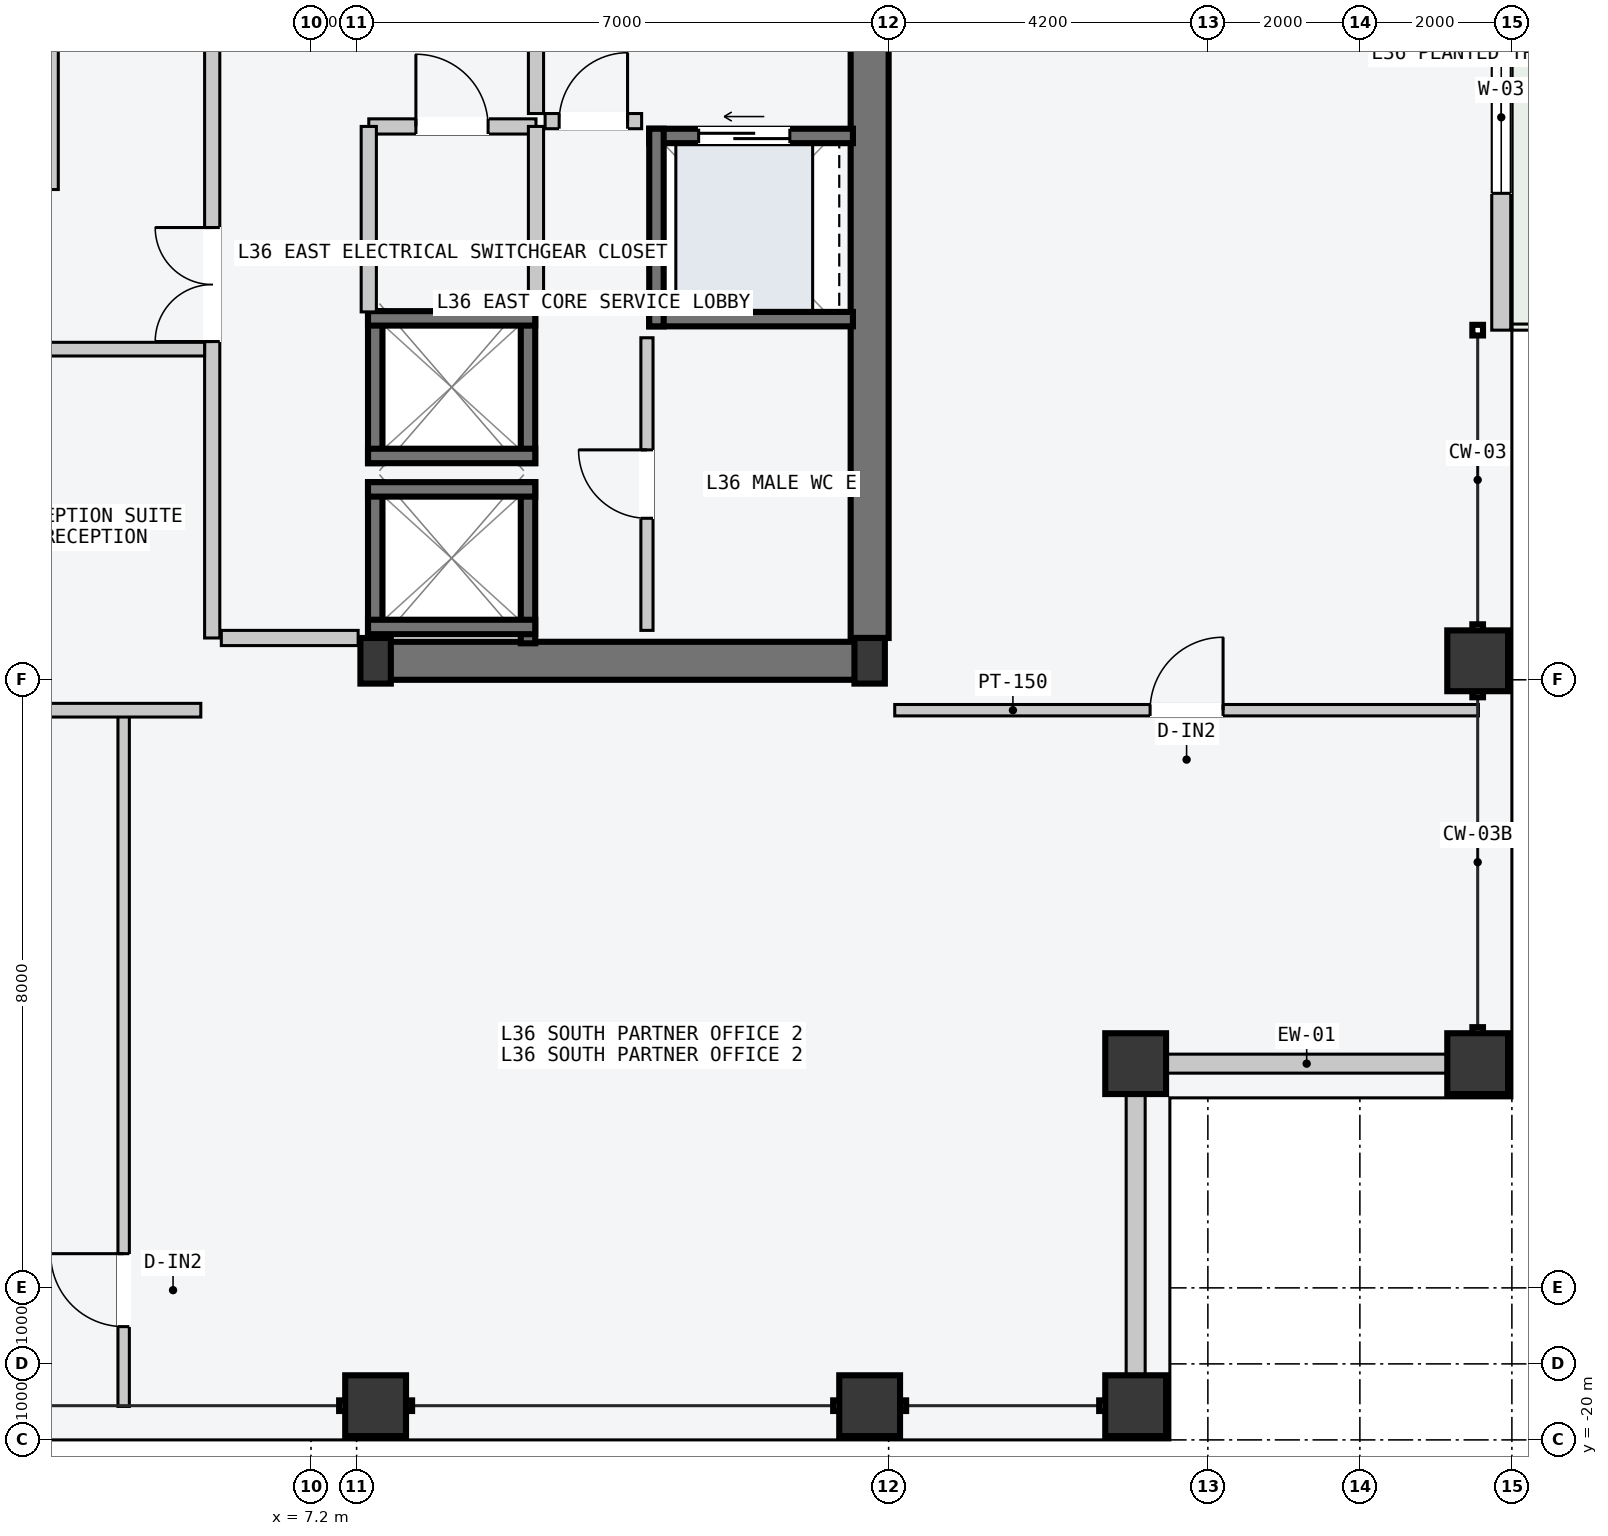
"""IFC4 building model, lengths in metres.
Left out: names, types, materials, properties, quantities, classifications, styles, units other than length and angle.
Written with IfcOpenShell. Run it as: python <this file> out.ifc"""

import sys

from ifc_helpers import new_model, si_unit, direction, frame, frame_2d, origin, origin_2d, place, context, subcontext, project, spatial, rectangle, hollow_rectangle, i_section, extrude, element, fill, save


model = new_model("IFC4")
c1 = context("Model", 3, precision=1e-05, world=origin(), true_north=direction((0.0, 1.0)))
c2 = subcontext(c1, "Body", "Model", "MODEL_VIEW")
j1 = project(units=[si_unit("LENGTHUNIT", "METRE"), si_unit("PLANEANGLEUNIT", "RADIAN")], contexts=[c1])
p1 = place(None, origin())
s1 = spatial("IfcSite", under=j1, at=p1, CompositionType="ELEMENT")
p2 = place(p1, origin())
s2 = spatial("IfcBuilding", under=s1, at=p2, CompositionType="ELEMENT")
p3 = place(p2, frame((0.0, 0.0, 138.6)))
s3 = spatial("IfcBuildingStorey", under=s2, at=p3, CompositionType="ELEMENT", Elevation=138.6)
p4 = place(p3, frame((8.07, -9.75, -0.2), z_axis=(0.0, 0.0, 1.0), x_axis=(1.0, 0.0, 0.0)))
e1 = element("IfcWall", 1, at=p4, inside=s3, PredefinedType="SHEAR", context=c2, shape_type="SweptSolid", body=[
    extrude(rectangle(XDim=6.46, YDim=0.5, at=frame_2d((3.23, 0.0))), origin(), (0.0, 0.0, 1.0), 3.6),
])
p5 = place(p3, frame((14.55, -9.45, -0.2), z_axis=(0.0, 0.0, 1.0), x_axis=(0.0, 1.0, 0.0)))
e2 = element("IfcWall", 2, at=p5, inside=s3, PredefinedType="SHEAR", context=c2, shape_type="SweptSolid", body=[
    extrude(rectangle(XDim=9.15, YDim=0.5, at=frame_2d((4.575, 0.0))), origin(), (0.0, 0.0, 1.0), 3.6),
])
for number, where, z_axis, x_axis in (
    (3, (8.05, -9.75, 0.0), (0.0, 0.0, 1.0), (1.0, 0.0, 0.0)),
    (4, (14.55, -9.75, 0.0), (0.0, 0.0, 1.0), (1.0, 0.0, 0.0)),
):
    element("IfcColumn", number, at=place(p3, frame(where, z_axis=z_axis, x_axis=x_axis)), inside=s3, PredefinedType="COLUMN", context=c2, shape_type="SweptSolid", body=[
        extrude(i_section(OverallWidth=0.4, OverallDepth=0.6, WebThickness=0.022, FlangeThickness=0.036, at=origin_2d()), origin(), (0.0, 0.0, 1.0), 3.6),
    ])
for number, where, z_axis, x_axis in (
    (5, (8.05, -19.55, 0.0), (0.0, 0.0, 1.0), (1.0, 0.0, 0.0)),
    (6, (14.55, -19.55, 0.0), (0.0, 0.0, 1.0), (1.0, 0.0, 0.0)),
    (7, (18.05, -19.55, 0.0), (0.0, 0.0, 1.0), (1.0, 0.0, 0.0)),
    (8, (22.55, -15.05, 0.0), (0.0, 0.0, 1.0), (0.0, 1.0, 0.0)),
    (9, (22.55, -9.75, 0.0), (0.0, 0.0, 1.0), (0.0, 1.0, 0.0)),
    (10, (18.05, -15.05, 0.0), (0.0, 0.0, 1.0), (1.0, 0.0, 0.0)),
):
    element("IfcColumn", number, at=place(p3, frame(where, z_axis=z_axis, x_axis=x_axis)), inside=s3, PredefinedType="COLUMN", context=c2, shape_type="SweptSolid", body=[
        extrude(hollow_rectangle(XDim=0.8, YDim=0.8, WallThickness=0.036, at=origin_2d()), origin(), (0.0, 0.0, 1.0), 3.6),
    ])
p6 = place(p3, frame((22.86, -5.4, 0.0), z_axis=(0.0, 0.0, 1.0), x_axis=(0.0, 1.0, 0.0)))
e11 = element("IfcWall", 11, at=p6, inside=s3, PredefinedType="STANDARD", context=c2, shape_type="SweptSolid", body=[
    extrude(rectangle(XDim=10.8, YDim=0.25, at=frame_2d((5.4, 0.0))), origin(), (0.0, 0.0, 1.0), 3.4),
])
p7 = place(p6, frame((7.2, 0.0, 0.0)))
e12 = element("IfcOpeningElement", 12, at=p7, cuts=e11, PredefinedType="OPENING", context=c2, shape_type="SweptSolid", body=[
    extrude(rectangle(XDim=1.6, YDim=2.2, at=frame_2d((0.8, 1.1))), frame((0.0, 0.135, 0.0), z_axis=(0.0, -1.0, 0.0), x_axis=(1.0, 0.0, 0.0)), (0.0, 0.0, 1.0), 0.27),
])
p8 = place(p6, frame((1.8, 0.0, 0.85)))
e13 = element("IfcOpeningElement", 13, at=p8, cuts=e11, PredefinedType="OPENING", context=c2, shape_type="SweptSolid", body=[
    extrude(rectangle(XDim=2.0, YDim=2.1, at=frame_2d((1.0, 1.05))), frame((0.0, 0.135, 0.0), z_axis=(0.0, -1.0, 0.0), x_axis=(1.0, 0.0, 0.0)), (0.0, 0.0, 1.0), 0.27),
])
for number, where, z_axis, x_axis in (
    (14, (18.46, -15.05, 0.0), (0.0, 0.0, 1.0), (1.0, 0.0, 0.0)),
    (15, (18.05, -19.14, 0.0), (0.0, 0.0, 1.0), (0.0, 1.0, 0.0)),
):
    element("IfcWall", number, at=place(p3, frame(where, z_axis=z_axis, x_axis=x_axis)), inside=s3, PredefinedType="STANDARD", context=c2, shape_type="SweptSolid", body=[
        extrude(rectangle(XDim=3.68, YDim=0.25, at=frame_2d((1.84, 0.0))), origin(), (0.0, 0.0, 1.0), 2.75),
    ])
for number, where, z_axis, x_axis in (
    (16, (8.045, -9.52, -0.2), (0.0, 0.0, 1.0), (0.0, 1.0, 0.0)),
    (17, (10.055, -9.52, -0.2), (0.0, 0.0, 1.0), (0.0, 1.0, 0.0)),
):
    element("IfcWall", number, at=place(p3, frame(where, z_axis=z_axis, x_axis=x_axis)), inside=s3, PredefinedType="SOLIDWALL", context=c2, shape_type="SweptSolid", body=[
        extrude(rectangle(XDim=2.12, YDim=0.19, at=frame_2d((1.06, 0.0))), origin(), (0.0, 0.0, 1.0), 3.6),
    ])
for number, where, z_axis, x_axis in (
    (18, (7.95, -7.495, -0.2), (0.0, 0.0, 1.0), (1.0, 0.0, 0.0)),
    (19, (7.95, -9.305, -0.2), (0.0, 0.0, 1.0), (1.0, 0.0, 0.0)),
):
    element("IfcWall", number, at=place(p3, frame(where, z_axis=z_axis, x_axis=x_axis)), inside=s3, PredefinedType="SOLIDWALL", context=c2, shape_type="SweptSolid", body=[
        extrude(rectangle(XDim=2.2, YDim=0.19, at=frame_2d((1.1, 0.0))), origin(), (0.0, 0.0, 1.0), 3.6),
    ])
for number, where, z_axis, x_axis in (
    (20, (8.045, -7.15, -0.2), (0.0, 0.0, 1.0), (0.0, 1.0, 0.0)),
    (21, (10.055, -7.15, -0.2), (0.0, 0.0, 1.0), (0.0, 1.0, 0.0)),
):
    element("IfcWall", number, at=place(p3, frame(where, z_axis=z_axis, x_axis=x_axis)), inside=s3, PredefinedType="SOLIDWALL", context=c2, shape_type="SweptSolid", body=[
        extrude(rectangle(XDim=2.0, YDim=0.19, at=frame_2d((1.0, 0.0))), origin(), (0.0, 0.0, 1.0), 3.6),
    ])
for number, where, z_axis, x_axis in (
    (22, (7.95, -5.245, -0.2), (0.0, 0.0, 1.0), (1.0, 0.0, 0.0)),
    (23, (7.95, -7.055, -0.2), (0.0, 0.0, 1.0), (1.0, 0.0, 0.0)),
):
    element("IfcWall", number, at=place(p3, frame(where, z_axis=z_axis, x_axis=x_axis)), inside=s3, PredefinedType="SOLIDWALL", context=c2, shape_type="SweptSolid", body=[
        extrude(rectangle(XDim=2.2, YDim=0.19, at=frame_2d((1.1, 0.0))), origin(), (0.0, 0.0, 1.0), 3.6),
    ])
p9 = place(p3, frame((11.65, -2.845, -0.2), z_axis=(0.0, 0.0, 1.0), x_axis=(1.0, 0.0, 0.0)))
e24 = element("IfcWall", 24, at=p9, inside=s3, PredefinedType="SOLIDWALL", context=c2, shape_type="SweptSolid", body=[
    extrude(rectangle(XDim=2.68, YDim=0.19, at=frame_2d((1.34, 0.0))), origin(), (0.0, 0.0, 1.0), 3.6),
])
p10 = place(p9, frame((0.65, 0.0, 0.2)))
e25 = element("IfcOpeningElement", 25, at=p10, cuts=e24, PredefinedType="OPENING", context=c2, shape_type="SweptSolid", body=[
    extrude(rectangle(XDim=1.2, YDim=2.2, at=frame_2d((0.6, 1.1))), frame((0.0, 0.105, 0.0), z_axis=(0.0, -1.0, 0.0), x_axis=(1.0, 0.0, 0.0)), (0.0, 0.0, 1.0), 0.21),
])
p11 = place(p3, frame((11.65, -5.255, -0.2), z_axis=(0.0, 0.0, 1.0), x_axis=(1.0, 0.0, 0.0)))
e26 = element("IfcWall", 26, at=p11, inside=s3, PredefinedType="SOLIDWALL", context=c2, shape_type="SweptSolid", body=[
    extrude(rectangle(XDim=2.68, YDim=0.19, at=frame_2d((1.34, 0.0))), origin(), (0.0, 0.0, 1.0), 3.6),
])
p12 = place(p3, frame((11.745, -5.35, -0.2), z_axis=(0.0, 0.0, 1.0), x_axis=(0.0, 1.0, 0.0)))
e27 = element("IfcWall", 27, at=p12, inside=s3, PredefinedType="SOLIDWALL", context=c2, shape_type="SweptSolid", body=[
    extrude(rectangle(XDim=2.6, YDim=0.19, at=frame_2d((1.3, 0.0))), origin(), (0.0, 0.0, 1.0), 3.6),
])
p13 = place(p3, frame((5.9, -9.45, 0.0), z_axis=(0.0, 0.0, 1.0), x_axis=(0.0, 1.0, 0.0)))
e28 = element("IfcWall", 28, at=p13, inside=s3, PredefinedType="PARTITIONING", context=c2, shape_type="SweptSolid", body=[
    extrude(rectangle(XDim=18.9, YDim=0.2, at=frame_2d((9.45, 0.0))), origin(), (0.0, 0.0, 1.0), 3.4),
])
p14 = place(p13, frame((3.9, 0.0, 0.0)))
e29 = element("IfcOpeningElement", 29, at=p14, cuts=e28, PredefinedType="OPENING", context=c2, shape_type="SweptSolid", body=[
    extrude(rectangle(XDim=1.5, YDim=2.2, at=frame_2d((0.75, 1.1))), frame((0.0, 0.11, 0.0), z_axis=(0.0, -1.0, 0.0), x_axis=(1.0, 0.0, 0.0)), (0.0, 0.0, 1.0), 0.22),
])
p15 = place(p3, frame((6.02, -9.45, 0.0), z_axis=(0.0, 0.0, 1.0), x_axis=(1.0, 0.0, 0.0)))
e30 = element("IfcWall", 30, at=p15, inside=s3, PredefinedType="PARTITIONING", context=c2, shape_type="SweptSolid", body=[
    extrude(rectangle(XDim=1.8, YDim=0.2, at=frame_2d((0.9, 0.0))), origin(), (0.0, 0.0, 1.0), 3.4),
])
p16 = place(p3, frame((10.16, -2.55, 0.0), z_axis=(0.0, 0.0, 1.0), x_axis=(0.0, 1.0, 0.0)))
e31 = element("IfcWall", 31, at=p16, inside=s3, PredefinedType="PARTITIONING", context=c2, shape_type="SweptSolid", body=[
    extrude(rectangle(XDim=3.4, YDim=0.2, at=frame_2d((1.7, 0.0))), origin(), (0.0, 0.0, 1.0), 3.4),
])
p17 = place(p16, frame((1.3, 0.0, 0.0)))
e32 = element("IfcOpeningElement", 32, at=p17, cuts=e31, PredefinedType="OPENING", context=c2, shape_type="SweptSolid", body=[
    extrude(rectangle(XDim=1.1, YDim=2.15, at=frame_2d((0.55, 1.075))), frame((0.0, 0.11, 0.0), z_axis=(0.0, -1.0, 0.0), x_axis=(1.0, 0.0, 0.0)), (0.0, 0.0, 1.0), 0.22),
])
p18 = place(p3, frame((10.28, -2.65, 0.0), z_axis=(0.0, 0.0, 1.0), x_axis=(1.0, 0.0, 0.0)))
e33 = element("IfcWall", 33, at=p18, inside=s3, PredefinedType="PARTITIONING", context=c2, shape_type="SweptSolid", body=[
    extrude(rectangle(XDim=1.27, YDim=0.2, at=frame_2d((0.635, 0.0))), origin(), (0.0, 0.0, 1.0), 3.4),
])
p19 = place(p18, frame((0.185, 0.0, 0.0)))
e34 = element("IfcOpeningElement", 34, at=p19, cuts=e33, PredefinedType="OPENING", context=c2, shape_type="SweptSolid", body=[
    extrude(rectangle(XDim=0.9, YDim=2.15, at=frame_2d((0.45, 1.075))), frame((0.0, 0.11, 0.0), z_axis=(0.0, -1.0, 0.0), x_axis=(1.0, 0.0, 0.0)), (0.0, 0.0, 1.0), 0.22),
])
p20 = place(p3, frame((7.96, -2.72, 0.0), z_axis=(0.0, 0.0, 1.0), x_axis=(1.0, 0.0, 0.0)))
e35 = element("IfcWall", 35, at=p20, inside=s3, PredefinedType="PARTITIONING", context=c2, shape_type="SweptSolid", body=[
    extrude(rectangle(XDim=2.2, YDim=0.2, at=frame_2d((1.1, 0.0))), origin(), (0.0, 0.0, 1.0), 3.4),
])
p21 = place(p20, frame((0.62, 0.0, 0.0)))
e36 = element("IfcOpeningElement", 36, at=p21, cuts=e35, PredefinedType="OPENING", context=c2, shape_type="SweptSolid", body=[
    extrude(rectangle(XDim=0.95, YDim=2.1, at=frame_2d((0.475, 1.05))), frame((0.0, 0.11, 0.0), z_axis=(0.0, -1.0, 0.0), x_axis=(1.0, 0.0, 0.0)), (0.0, 0.0, 1.0), 0.22),
])
for number, where, z_axis, x_axis in (
    (37, (7.96, -5.16, 0.0), (0.0, 0.0, 1.0), (0.0, 1.0, 0.0)),
    (38, (10.16, -5.16, 0.0), (0.0, 0.0, 1.0), (0.0, 1.0, 0.0)),
):
    element("IfcWall", number, at=place(p3, frame(where, z_axis=z_axis, x_axis=x_axis)), inside=s3, PredefinedType="PARTITIONING", context=c2, shape_type="SweptSolid", body=[
        extrude(rectangle(XDim=2.44, YDim=0.2, at=frame_2d((1.22, 0.0))), origin(), (0.0, 0.0, 1.0), 3.4),
    ])
p22 = place(p3, frame((11.62, -9.35, 0.0), z_axis=(0.0, 0.0, 1.0), x_axis=(0.0, 1.0, 0.0)))
e39 = element("IfcWall", 39, at=p22, inside=s3, PredefinedType="PARTITIONING", context=c2, shape_type="SweptSolid", body=[
    extrude(rectangle(XDim=3.85, YDim=0.16, at=frame_2d((1.925, 0.0))), origin(), (0.0, 0.0, 1.0), 3.4),
])
p23 = place(p22, frame((1.475, 0.0, 0.0)))
e40 = element("IfcOpeningElement", 40, at=p23, cuts=e39, PredefinedType="OPENING", context=c2, shape_type="SweptSolid", body=[
    extrude(rectangle(XDim=0.9, YDim=2.15, at=frame_2d((0.45, 1.075))), frame((0.0, 0.09, 0.0), z_axis=(0.0, -1.0, 0.0), x_axis=(1.0, 0.0, 0.0)), (0.0, 0.0, 1.0), 0.18),
])
p24 = place(p3, frame((3.8, -3.55, 0.0), z_axis=(0.0, 0.0, 1.0), x_axis=(0.0, 1.0, 0.0)))
e41 = element("IfcWall", 41, at=p24, inside=s3, PredefinedType="PARTITIONING", context=c2, shape_type="SweptSolid", body=[
    extrude(rectangle(XDim=14.77, YDim=0.15, at=frame_2d((7.385, 0.0))), origin(), (0.0, 0.0, 1.0), 3.4),
])
p25 = place(p3, frame((-5.8, -5.65, 0.0), z_axis=(0.0, 0.0, 1.0), x_axis=(1.0, 0.0, 0.0)))
e42 = element("IfcWall", 42, at=p25, inside=s3, PredefinedType="PARTITIONING", context=c2, shape_type="SweptSolid", body=[
    extrude(rectangle(XDim=11.6, YDim=0.18, at=frame_2d((5.8, 0.0))), origin(), (0.0, 0.0, 1.0), 3.4),
])
p26 = place(p25, frame((5.1, 0.0, 0.0)))
e43 = element("IfcOpeningElement", 43, at=p26, cuts=e42, PredefinedType="OPENING", context=c2, shape_type="SweptSolid", body=[
    extrude(rectangle(XDim=1.4, YDim=2.2, at=frame_2d((0.7, 1.1))), frame((0.0, 0.1, 0.0), z_axis=(0.0, -1.0, 0.0), x_axis=(1.0, 0.0, 0.0)), (0.0, 0.0, 1.0), 0.2),
])
p27 = place(p3, frame((4.735, -19.56, 0.0), z_axis=(0.0, 0.0, 1.0), x_axis=(0.0, 1.0, 0.0)))
e44 = element("IfcWall", 44, at=p27, inside=s3, PredefinedType="PARTITIONING", context=c2, shape_type="SweptSolid", body=[
    extrude(rectangle(XDim=9.1, YDim=0.15, at=frame_2d((4.55, 0.0))), origin(), (0.0, 0.0, 1.0), 3.4),
])
p28 = place(p27, frame((1.05, 0.0, 0.0)))
e45 = element("IfcOpeningElement", 45, at=p28, cuts=e44, PredefinedType="OPENING", context=c2, shape_type="SweptSolid", body=[
    extrude(rectangle(XDim=0.96, YDim=2.18, at=frame_2d((0.48, 1.09))), frame((0.0, 0.085, 0.0), z_axis=(0.0, -1.0, 0.0), x_axis=(1.0, 0.0, 0.0)), (0.0, 0.0, 1.0), 0.17),
])
p29 = place(p3, frame((-5.75, -10.4, 0.0), z_axis=(0.0, 0.0, 1.0), x_axis=(1.0, 0.0, 0.0)))
e46 = element("IfcWall", 46, at=p29, inside=s3, PredefinedType="PARTITIONING", context=c2, shape_type="SweptSolid", body=[
    extrude(rectangle(XDim=11.5, YDim=0.18, at=frame_2d((5.75, 0.0))), origin(), (0.0, 0.0, 1.0), 3.4),
])
p30 = place(p29, frame((4.542, 0.0, 0.0)))
e47 = element("IfcOpeningElement", 47, at=p30, cuts=e46, PredefinedType="OPENING", context=c2, shape_type="SweptSolid", body=[
    extrude(rectangle(XDim=1.4, YDim=2.2, at=frame_2d((0.7, 1.1))), frame((0.0, 0.1, 0.0), z_axis=(0.0, -1.0, 0.0), x_axis=(1.0, 0.0, 0.0)), (0.0, 0.0, 1.0), 0.2),
])
p31 = place(p3, frame((14.88, -10.4, 0.0), z_axis=(0.0, 0.0, 1.0), x_axis=(1.0, 0.0, 0.0)))
e48 = element("IfcWall", 48, at=p31, inside=s3, PredefinedType="PARTITIONING", context=c2, shape_type="SweptSolid", body=[
    extrude(rectangle(XDim=7.68, YDim=0.15, at=frame_2d((3.84, 0.0))), origin(), (0.0, 0.0, 1.0), 3.4),
])
p32 = place(p31, frame((3.36, 0.0, 0.0)))
e49 = element("IfcOpeningElement", 49, at=p32, cuts=e48, PredefinedType="OPENING", context=c2, shape_type="SweptSolid", body=[
    extrude(rectangle(XDim=0.96, YDim=2.18, at=frame_2d((0.48, 1.09))), frame((0.0, 0.085, 0.0), z_axis=(0.0, -1.0, 0.0), x_axis=(1.0, 0.0, 0.0)), (0.0, 0.0, 1.0), 0.17),
])
p33 = place(p8, origin())
e50 = element("IfcWindow", 50, at=p33, inside=s3, PartitioningType="SINGLE_PANEL", PredefinedType="WINDOW", context=c2, shape_type="SweptSolid", body=[
    extrude(rectangle(XDim=2.0, YDim=2.1, at=frame_2d((1.0, 1.05))), frame((0.0, 0.03, 0.0), z_axis=(0.0, -1.0, 0.0), x_axis=(1.0, 0.0, 0.0)), (0.0, 0.0, 1.0), 0.06),
])
fill(e13, e50)
p34 = place(p10, origin())
e51 = element("IfcDoor", 51, at=p34, inside=s3, OperationType="SLIDING_TO_LEFT", PredefinedType="DOOR", context=c2, shape_type="SweptSolid", body=[
    extrude(rectangle(XDim=1.2, YDim=2.2, at=frame_2d((0.6, 1.1))), frame((0.0, 0.025, 0.0), z_axis=(0.0, -1.0, 0.0), x_axis=(1.0, 0.0, 0.0)), (0.0, 0.0, 1.0), 0.05),
])
fill(e25, e51)
p35 = place(p14, origin())
e52 = element("IfcDoor", 52, at=p35, inside=s3, OperationType="DOUBLE_DOOR_SINGLE_SWING", PredefinedType="DOOR", context=c2, shape_type="SweptSolid", body=[
    extrude(rectangle(XDim=1.5, YDim=2.2, at=frame_2d((0.75, 1.1))), frame((0.0, 0.025, 0.0), z_axis=(0.0, -1.0, 0.0), x_axis=(1.0, 0.0, 0.0)), (0.0, 0.0, 1.0), 0.05),
])
fill(e29, e52)
p36 = place(p19, origin())
e53 = element("IfcDoor", 53, at=p36, inside=s3, OperationType="SINGLE_SWING_RIGHT", PredefinedType="DOOR", context=c2, shape_type="SweptSolid", body=[
    extrude(rectangle(XDim=0.9, YDim=2.15, at=frame_2d((0.45, 1.075))), frame((0.0, 0.025, 0.0), z_axis=(0.0, -1.0, 0.0), x_axis=(1.0, 0.0, 0.0)), (0.0, 0.0, 1.0), 0.05),
])
fill(e34, e53)
p37 = place(p21, origin())
e54 = element("IfcDoor", 54, at=p37, inside=s3, OperationType="SINGLE_SWING_LEFT", PredefinedType="DOOR", context=c2, shape_type="SweptSolid", body=[
    extrude(rectangle(XDim=0.95, YDim=2.1, at=frame_2d((0.475, 1.05))), frame((0.0, 0.025, 0.0), z_axis=(0.0, -1.0, 0.0), x_axis=(1.0, 0.0, 0.0)), (0.0, 0.0, 1.0), 0.05),
])
fill(e36, e54)
p38 = place(p23, origin())
e55 = element("IfcDoor", 55, at=p38, inside=s3, OperationType="SINGLE_SWING_RIGHT", PredefinedType="DOOR", context=c2, shape_type="SweptSolid", body=[
    extrude(rectangle(XDim=0.9, YDim=2.15, at=frame_2d((0.45, 1.075))), frame((0.0, 0.025, 0.0), z_axis=(0.0, -1.0, 0.0), x_axis=(1.0, 0.0, 0.0)), (0.0, 0.0, 1.0), 0.05),
])
fill(e40, e55)
p39 = place(p28, origin())
e56 = element("IfcDoor", 56, at=p39, inside=s3, OperationType="SINGLE_SWING_RIGHT", PredefinedType="DOOR", context=c2, shape_type="SweptSolid", body=[
    extrude(rectangle(XDim=0.96, YDim=2.18, at=frame_2d((0.48, 1.09))), frame((0.0, 0.025, 0.0), z_axis=(0.0, -1.0, 0.0), x_axis=(1.0, 0.0, 0.0)), (0.0, 0.0, 1.0), 0.05),
])
fill(e45, e56)
p40 = place(p32, origin())
e57 = element("IfcDoor", 57, at=p40, inside=s3, OperationType="SINGLE_SWING_RIGHT", PredefinedType="DOOR", context=c2, shape_type="SweptSolid", body=[
    extrude(rectangle(XDim=0.96, YDim=2.18, at=frame_2d((0.48, 1.09))), frame((0.0, 0.025, 0.0), z_axis=(0.0, -1.0, 0.0), x_axis=(1.0, 0.0, 0.0)), (0.0, 0.0, 1.0), 0.05),
])
fill(e49, e57)
save(model, sys.argv[1])
